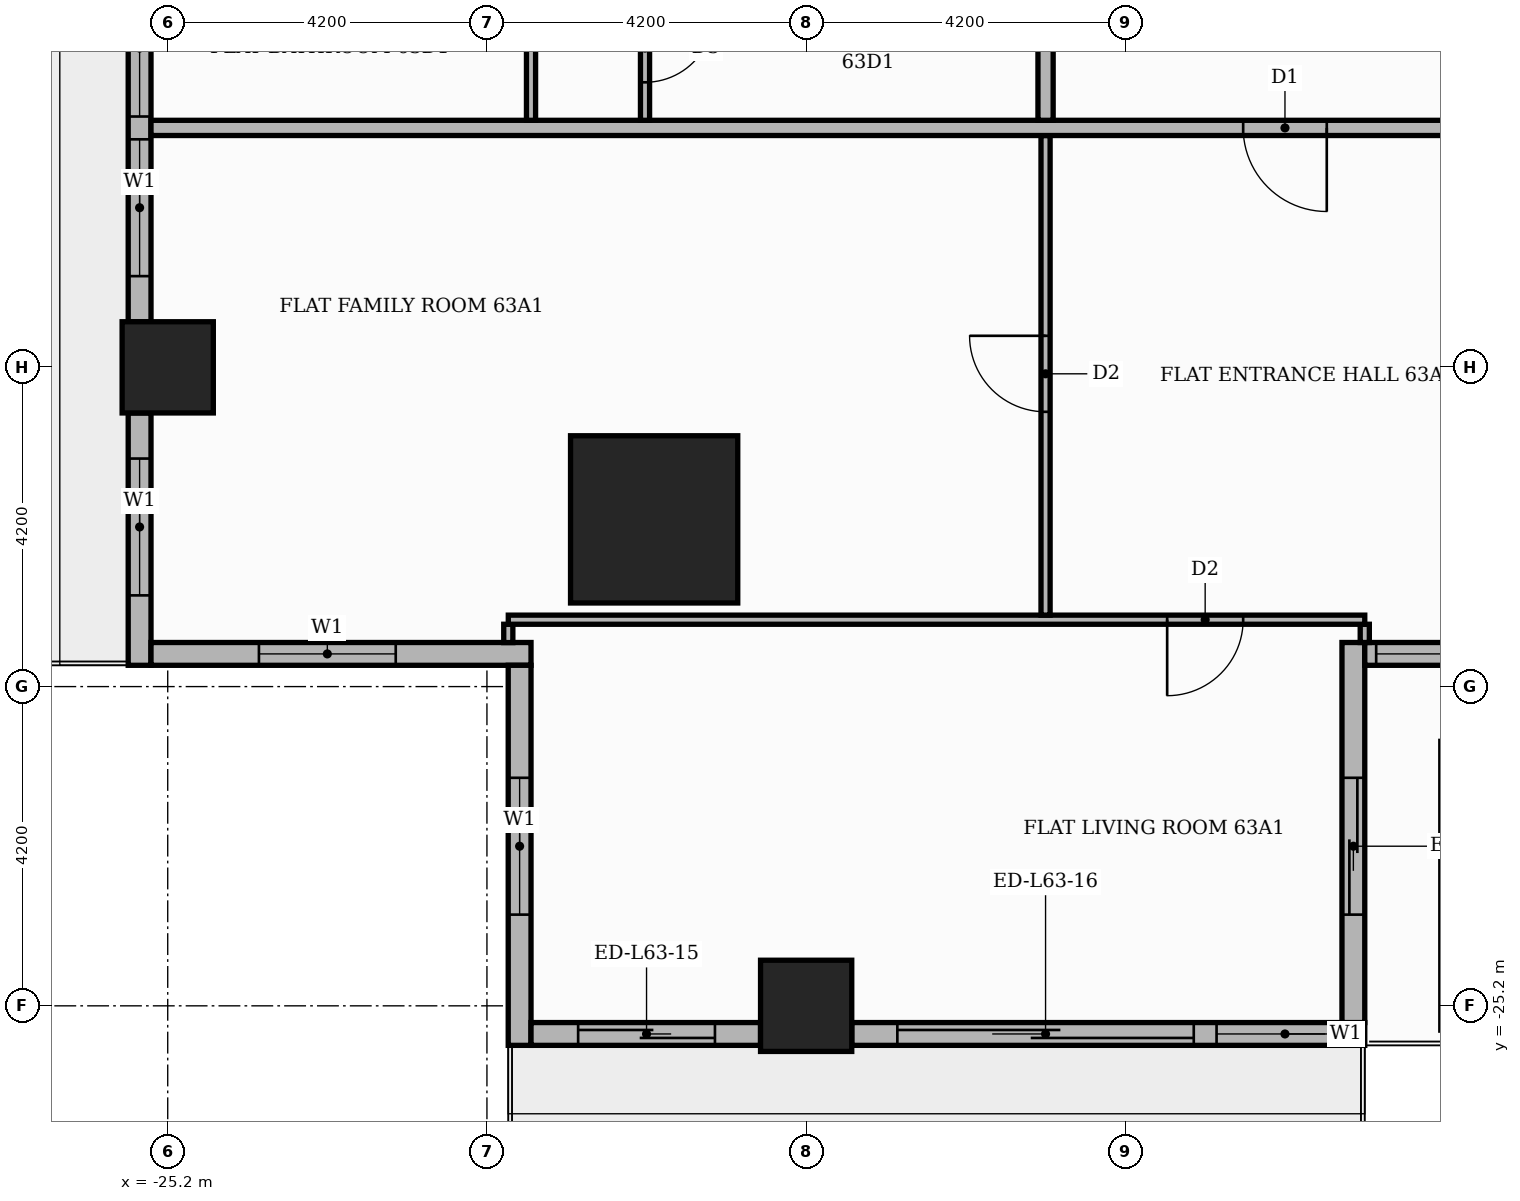
"""IFC4 building model, lengths in metres.
Left out: names, types, materials, properties, quantities, classifications, styles, units other than length and angle.
Written with IfcOpenShell. Run it as: python <this file> out.ifc"""

import sys

from ifc_helpers import new_model, si_unit, direction, frame, frame_2d, origin, origin_2d, place, context, subcontext, project, spatial, rectangle, extrude, element, fill, save


model = new_model("IFC4")
c1 = context("Model", 3, precision=1e-05, world=origin(), true_north=direction((0.0, 1.0)))
c2 = subcontext(c1, "Body", "Model", "MODEL_VIEW")
j1 = project(units=[si_unit("LENGTHUNIT", "METRE"), si_unit("PLANEANGLEUNIT", "RADIAN")], contexts=[c1])
p1 = place(None, origin())
s1 = spatial("IfcSite", under=j1, at=p1, CompositionType="ELEMENT")
p2 = place(p1, origin())
s2 = spatial("IfcBuilding", under=s1, at=p2, CompositionType="ELEMENT")
p3 = place(p2, frame((0.0, 0.0, 264.0)))
s3 = spatial("IfcBuildingStorey", under=s2, at=p3, CompositionType="ELEMENT", Elevation=264.0)
p4 = place(p3, frame((-18.8, -18.8, 0.0), z_axis=(0.0, 0.0, 1.0), x_axis=(1.0, 0.0, 0.0)))
e1 = element("IfcColumn", 1, at=p4, inside=s3, PredefinedType="COLUMN", context=c2, shape_type="SweptSolid", body=[
    extrude(rectangle(XDim=2.2, YDim=2.2, at=origin_2d()), origin(), (0.0, 0.0, 1.0), 3.9),
])
for number, where, z_axis, x_axis in (
    (2, (-16.8, -25.2, 0.0), (0.0, 0.0, 1.0), (1.0, 0.0, 0.0)),
    (3, (-25.2, -16.8, 0.0), (0.0, 0.0, 1.0), (1.0, 0.0, 0.0)),
):
    element("IfcColumn", number, at=place(p3, frame(where, z_axis=z_axis, x_axis=x_axis)), inside=s3, PredefinedType="COLUMN", context=c2, shape_type="SweptSolid", body=[
        extrude(rectangle(XDim=1.2, YDim=1.2, at=origin_2d()), origin(), (0.0, 0.0, 1.0), 3.9),
    ])
p5 = place(p3, frame((-25.57, -9.0, 0.0), z_axis=(0.0, 0.0, 1.0), x_axis=(0.0, -1.0, 0.0)))
e4 = element("IfcWall", 4, at=p5, inside=s3, PredefinedType="STANDARD", context=c2, shape_type="SweptSolid", body=[
    extrude(rectangle(XDim=7.2, YDim=0.3, at=frame_2d((3.6, 0.0))), origin(), (0.0, 0.0, 1.0), 3.48),
])
p6 = place(p5, frame((0.6, 0.0, 0.9)))
e5 = element("IfcOpeningElement", 5, at=p6, cuts=e4, PredefinedType="OPENING", context=c2, shape_type="SweptSolid", body=[
    extrude(rectangle(XDim=1.8, YDim=2.1, at=frame_2d((0.9, 1.05))), frame((0.0, 0.16, 0.0), z_axis=(0.0, -1.0, 0.0), x_axis=(1.0, 0.0, 0.0)), (0.0, 0.0, 1.0), 0.32),
])
p7 = place(p5, frame((2.7, 0.0, 0.9)))
e6 = element("IfcOpeningElement", 6, at=p7, cuts=e4, PredefinedType="OPENING", context=c2, shape_type="SweptSolid", body=[
    extrude(rectangle(XDim=1.8, YDim=2.1, at=frame_2d((0.9, 1.05))), frame((0.0, 0.16, 0.0), z_axis=(0.0, -1.0, 0.0), x_axis=(1.0, 0.0, 0.0)), (0.0, 0.0, 1.0), 0.32),
])
p8 = place(p5, frame((4.8, 0.0, 0.9)))
e7 = element("IfcOpeningElement", 7, at=p8, cuts=e4, PredefinedType="OPENING", context=c2, shape_type="SweptSolid", body=[
    extrude(rectangle(XDim=1.8, YDim=2.1, at=frame_2d((0.9, 1.05))), frame((0.0, 0.16, 0.0), z_axis=(0.0, -1.0, 0.0), x_axis=(1.0, 0.0, 0.0)), (0.0, 0.0, 1.0), 0.32),
])
p9 = place(p3, frame((-25.57, -17.4, 0.0), z_axis=(0.0, 0.0, 1.0), x_axis=(0.0, -1.0, 0.0)))
e8 = element("IfcWall", 8, at=p9, inside=s3, PredefinedType="STANDARD", context=c2, shape_type="SweptSolid", body=[
    extrude(rectangle(XDim=3.32, YDim=0.3, at=frame_2d((1.66, 0.0))), origin(), (0.0, 0.0, 1.0), 3.48),
])
p10 = place(p9, frame((0.6, 0.0, 0.9)))
e9 = element("IfcOpeningElement", 9, at=p10, cuts=e8, PredefinedType="OPENING", context=c2, shape_type="SweptSolid", body=[
    extrude(rectangle(XDim=1.8, YDim=2.1, at=frame_2d((0.9, 1.05))), frame((0.0, 0.16, 0.0), z_axis=(0.0, -1.0, 0.0), x_axis=(1.0, 0.0, 0.0)), (0.0, 0.0, 1.0), 0.32),
])
p11 = place(p3, frame((-25.42, -20.57, 0.0), z_axis=(0.0, 0.0, 1.0), x_axis=(1.0, 0.0, 0.0)))
e10 = element("IfcWall", 10, at=p11, inside=s3, PredefinedType="STANDARD", context=c2, shape_type="SweptSolid", body=[
    extrude(rectangle(XDim=5.0, YDim=0.3, at=frame_2d((2.5, 0.0))), origin(), (0.0, 0.0, 1.0), 3.48),
])
p12 = place(p11, frame((1.42, 0.0, 0.9)))
e11 = element("IfcOpeningElement", 11, at=p12, cuts=e10, PredefinedType="OPENING", context=c2, shape_type="SweptSolid", body=[
    extrude(rectangle(XDim=1.8, YDim=2.1, at=frame_2d((0.9, 1.05))), frame((0.0, 0.16, 0.0), z_axis=(0.0, -1.0, 0.0), x_axis=(1.0, 0.0, 0.0)), (0.0, 0.0, 1.0), 0.32),
])
p13 = place(p3, frame((-20.57, -20.72, 0.0), z_axis=(0.0, 0.0, 1.0), x_axis=(0.0, -1.0, 0.0)))
e12 = element("IfcWall", 12, at=p13, inside=s3, PredefinedType="STANDARD", context=c2, shape_type="SweptSolid", body=[
    extrude(rectangle(XDim=5.0, YDim=0.3, at=frame_2d((2.5, 0.0))), origin(), (0.0, 0.0, 1.0), 3.48),
])
p14 = place(p13, frame((1.48, 0.0, 0.9)))
e13 = element("IfcOpeningElement", 13, at=p14, cuts=e12, PredefinedType="OPENING", context=c2, shape_type="SweptSolid", body=[
    extrude(rectangle(XDim=1.8, YDim=2.1, at=frame_2d((0.9, 1.05))), frame((0.0, 0.16, 0.0), z_axis=(0.0, -1.0, 0.0), x_axis=(1.0, 0.0, 0.0)), (0.0, 0.0, 1.0), 0.32),
])
p15 = place(p3, frame((-20.42, -25.57, 0.0), z_axis=(0.0, 0.0, 1.0), x_axis=(1.0, 0.0, 0.0)))
e14 = element("IfcWall", 14, at=p15, inside=s3, PredefinedType="STANDARD", context=c2, shape_type="SweptSolid", body=[
    extrude(rectangle(XDim=3.02, YDim=0.3, at=frame_2d((1.51, 0.0))), origin(), (0.0, 0.0, 1.0), 3.48),
])
p16 = place(p15, frame((0.62, 0.0, 0.0)))
e15 = element("IfcOpeningElement", 15, at=p16, cuts=e14, PredefinedType="OPENING", context=c2, shape_type="SweptSolid", body=[
    extrude(rectangle(XDim=1.8, YDim=2.4, at=frame_2d((0.9, 1.2))), frame((0.0, 0.16, 0.0), z_axis=(0.0, -1.0, 0.0), x_axis=(1.0, 0.0, 0.0)), (0.0, 0.0, 1.0), 0.32),
])
p17 = place(p3, frame((-16.2, -25.57, 0.0), z_axis=(0.0, 0.0, 1.0), x_axis=(1.0, 0.0, 0.0)))
e16 = element("IfcWall", 16, at=p17, inside=s3, PredefinedType="STANDARD", context=c2, shape_type="SweptSolid", body=[
    extrude(rectangle(XDim=6.75, YDim=0.3, at=frame_2d((3.375, 0.0))), origin(), (0.0, 0.0, 1.0), 3.48),
])
p18 = place(p17, frame((0.6, 0.0, 0.0)))
e17 = element("IfcOpeningElement", 17, at=p18, cuts=e16, PredefinedType="OPENING", context=c2, shape_type="SweptSolid", body=[
    extrude(rectangle(XDim=3.9, YDim=2.4, at=frame_2d((1.95, 1.2))), frame((0.0, 0.16, 0.0), z_axis=(0.0, -1.0, 0.0), x_axis=(1.0, 0.0, 0.0)), (0.0, 0.0, 1.0), 0.32),
])
p19 = place(p17, frame((4.8, 0.0, 0.9)))
e18 = element("IfcOpeningElement", 18, at=p19, cuts=e16, PredefinedType="OPENING", context=c2, shape_type="SweptSolid", body=[
    extrude(rectangle(XDim=1.8, YDim=2.1, at=frame_2d((0.9, 1.05))), frame((0.0, 0.16, 0.0), z_axis=(0.0, -1.0, 0.0), x_axis=(1.0, 0.0, 0.0)), (0.0, 0.0, 1.0), 0.32),
])
p20 = place(p3, frame((-9.6, -25.42, 0.0), z_axis=(0.0, 0.0, 1.0), x_axis=(0.0, 1.0, 0.0)))
e19 = element("IfcWall", 19, at=p20, inside=s3, PredefinedType="STANDARD", context=c2, shape_type="SweptSolid", body=[
    extrude(rectangle(XDim=5.0, YDim=0.3, at=frame_2d((2.5, 0.0))), origin(), (0.0, 0.0, 1.0), 3.48),
])
p21 = place(p20, frame((1.42, 0.0, 0.0)))
e20 = element("IfcOpeningElement", 20, at=p21, cuts=e19, PredefinedType="OPENING", context=c2, shape_type="SweptSolid", body=[
    extrude(rectangle(XDim=1.8, YDim=2.4, at=frame_2d((0.9, 1.2))), frame((0.0, 0.16, 0.0), z_axis=(0.0, -1.0, 0.0), x_axis=(1.0, 0.0, 0.0)), (0.0, 0.0, 1.0), 0.32),
])
p22 = place(p3, frame((-9.45, -20.57, 0.0), z_axis=(0.0, 0.0, 1.0), x_axis=(1.0, 0.0, 0.0)))
e21 = element("IfcWall", 21, at=p22, inside=s3, PredefinedType="STANDARD", context=c2, shape_type="SweptSolid", body=[
    extrude(rectangle(XDim=19.2, YDim=0.3, at=frame_2d((9.6, 0.0))), origin(), (0.0, 0.0, 1.0), 3.48),
])
p23 = place(p22, frame((0.15, 0.0, 0.9)))
e22 = element("IfcOpeningElement", 22, at=p23, cuts=e21, PredefinedType="OPENING", context=c2, shape_type="SweptSolid", body=[
    extrude(rectangle(XDim=6.0, YDim=2.1, at=frame_2d((3.0, 1.05))), frame((0.0, 0.16, 0.0), z_axis=(0.0, -1.0, 0.0), x_axis=(1.0, 0.0, 0.0)), (0.0, 0.0, 1.0), 0.32),
])
p24 = place(p22, frame((6.45, 0.0, 0.9)))
e23 = element("IfcOpeningElement", 23, at=p24, cuts=e21, PredefinedType="OPENING", context=c2, shape_type="SweptSolid", body=[
    extrude(rectangle(XDim=6.0, YDim=2.1, at=frame_2d((3.0, 1.05))), frame((0.0, 0.16, 0.0), z_axis=(0.0, -1.0, 0.0), x_axis=(1.0, 0.0, 0.0)), (0.0, 0.0, 1.0), 0.32),
])
p25 = place(p22, frame((12.75, 0.0, 0.9)))
e24 = element("IfcOpeningElement", 24, at=p25, cuts=e21, PredefinedType="OPENING", context=c2, shape_type="SweptSolid", body=[
    extrude(rectangle(XDim=6.0, YDim=2.1, at=frame_2d((3.0, 1.05))), frame((0.0, 0.16, 0.0), z_axis=(0.0, -1.0, 0.0), x_axis=(1.0, 0.0, 0.0)), (0.0, 0.0, 1.0), 0.32),
])
p26 = place(p3, frame((-20.719, -20.421, 0.0), z_axis=(0.0, 0.0, 1.0), x_axis=(0.0, 1.0, 0.0)))
e25 = element("IfcWall", 25, at=p26, inside=s3, PredefinedType="PARTITIONING", context=c2, shape_type="SweptSolid", body=[
    extrude(rectangle(XDim=0.241, YDim=0.12, at=frame_2d((0.121, 0.0))), origin(), (0.0, 0.0, 1.0), 3.48),
])
p27 = place(p3, frame((-9.45, -20.42, 0.0), z_axis=(0.0, 0.0, 1.0), x_axis=(0.0, 1.0, 0.0)))
e26 = element("IfcWall", 26, at=p27, inside=s3, PredefinedType="PARTITIONING", context=c2, shape_type="SweptSolid", body=[
    extrude(rectangle(XDim=0.24, YDim=0.12, at=frame_2d((0.12, 0.0))), origin(), (0.0, 0.0, 1.0), 3.48),
])
p28 = place(p3, frame((-20.719, -20.12, 0.0), z_axis=(0.0, 0.0, 1.0), x_axis=(1.0, 0.0, 0.0)))
e27 = element("IfcWall", 27, at=p28, inside=s3, PredefinedType="PARTITIONING", context=c2, shape_type="SweptSolid", body=[
    extrude(rectangle(XDim=11.269, YDim=0.12, at=frame_2d((5.635, 0.0))), origin(), (0.0, 0.0, 1.0), 3.48),
])
p29 = place(p28, frame((8.669, 0.0, 0.0)))
e28 = element("IfcOpeningElement", 28, at=p29, cuts=e27, PredefinedType="OPENING", context=c2, shape_type="SweptSolid", body=[
    extrude(rectangle(XDim=1.0, YDim=2.1, at=frame_2d((0.5, 1.05))), frame((0.0, 0.07, 0.0), z_axis=(0.0, -1.0, 0.0), x_axis=(1.0, 0.0, 0.0)), (0.0, 0.0, 1.0), 0.14),
])
p30 = place(p3, frame((-13.65, -20.06, 0.0), z_axis=(0.0, 0.0, 1.0), x_axis=(0.0, 1.0, 0.0)))
e29 = element("IfcWall", 29, at=p30, inside=s3, PredefinedType="PARTITIONING", context=c2, shape_type="SweptSolid", body=[
    extrude(rectangle(XDim=6.31, YDim=0.12, at=frame_2d((3.155, 0.0))), origin(), (0.0, 0.0, 1.0), 3.48),
])
p31 = place(p30, frame((2.675, 0.0, 0.0)))
e30 = element("IfcOpeningElement", 30, at=p31, cuts=e29, PredefinedType="OPENING", context=c2, shape_type="SweptSolid", body=[
    extrude(rectangle(XDim=1.0, YDim=2.1, at=frame_2d((0.5, 1.05))), frame((0.0, 0.07, 0.0), z_axis=(0.0, -1.0, 0.0), x_axis=(1.0, 0.0, 0.0)), (0.0, 0.0, 1.0), 0.14),
])
p32 = place(p3, frame((-25.42, -13.65, 0.0), z_axis=(0.0, 0.0, 1.0), x_axis=(1.0, 0.0, 0.0)))
e31 = element("IfcWall", 31, at=p32, inside=s3, PredefinedType="PARTITIONING", context=c2, shape_type="SweptSolid", body=[
    extrude(rectangle(XDim=39.07, YDim=0.2, at=frame_2d((19.535, 0.0))), origin(), (0.0, 0.0, 1.0), 3.48),
])
p33 = place(p32, frame((14.37, 0.0, 0.0)))
e32 = element("IfcOpeningElement", 32, at=p33, cuts=e31, PredefinedType="OPENING", context=c2, shape_type="SweptSolid", body=[
    extrude(rectangle(XDim=1.1, YDim=2.4, at=frame_2d((0.55, 1.2))), frame((0.0, 0.11, 0.0), z_axis=(0.0, -1.0, 0.0), x_axis=(1.0, 0.0, 0.0)), (0.0, 0.0, 1.0), 0.22),
])
p34 = place(p3, frame((-20.42, -13.55, 0.0), z_axis=(0.0, 0.0, 1.0), x_axis=(0.0, 1.0, 0.0)))
e33 = element("IfcWall", 33, at=p34, inside=s3, PredefinedType="PARTITIONING", context=c2, shape_type="SweptSolid", body=[
    extrude(rectangle(XDim=1.94, YDim=0.12, at=frame_2d((0.97, 0.0))), origin(), (0.0, 0.0, 1.0), 3.48),
])
p35 = place(p3, frame((-18.92, -13.55, 0.0), z_axis=(0.0, 0.0, 1.0), x_axis=(0.0, 1.0, 0.0)))
e34 = element("IfcWall", 34, at=p35, inside=s3, PredefinedType="PARTITIONING", context=c2, shape_type="SweptSolid", body=[
    extrude(rectangle(XDim=1.94, YDim=0.12, at=frame_2d((0.97, 0.0))), origin(), (0.0, 0.0, 1.0), 3.48),
])
p36 = place(p35, frame((0.5, 0.0, 0.0)))
e35 = element("IfcOpeningElement", 35, at=p36, cuts=e34, PredefinedType="OPENING", context=c2, shape_type="SweptSolid", body=[
    extrude(rectangle(XDim=0.9, YDim=2.1, at=frame_2d((0.45, 1.05))), frame((0.0, 0.07, 0.0), z_axis=(0.0, -1.0, 0.0), x_axis=(1.0, 0.0, 0.0)), (0.0, 0.0, 1.0), 0.14),
])
p37 = place(p3, frame((-13.65, -13.55, 0.0), z_axis=(0.0, 0.0, 1.0), x_axis=(0.0, 1.0, 0.0)))
e36 = element("IfcWall", 36, at=p37, inside=s3, PredefinedType="PARTITIONING", context=c2, shape_type="SweptSolid", body=[
    extrude(rectangle(XDim=2.45, YDim=0.2, at=frame_2d((1.225, 0.0))), origin(), (0.0, 0.0, 1.0), 3.48),
])
p38 = place(p7, origin())
e37 = element("IfcWindow", 37, at=p38, inside=s3, PartitioningType="SINGLE_PANEL", PredefinedType="WINDOW", context=c2, shape_type="SweptSolid", body=[
    extrude(rectangle(XDim=1.8, YDim=2.1, at=frame_2d((0.9, 1.05))), frame((0.0, 0.03, 0.0), z_axis=(0.0, -1.0, 0.0), x_axis=(1.0, 0.0, 0.0)), (0.0, 0.0, 1.0), 0.06),
])
fill(e6, e37)
p39 = place(p8, origin())
e38 = element("IfcWindow", 38, at=p39, inside=s3, PartitioningType="SINGLE_PANEL", PredefinedType="WINDOW", context=c2, shape_type="SweptSolid", body=[
    extrude(rectangle(XDim=1.8, YDim=2.1, at=frame_2d((0.9, 1.05))), frame((0.0, 0.03, 0.0), z_axis=(0.0, -1.0, 0.0), x_axis=(1.0, 0.0, 0.0)), (0.0, 0.0, 1.0), 0.06),
])
fill(e7, e38)
p40 = place(p10, origin())
e39 = element("IfcWindow", 39, at=p40, inside=s3, PartitioningType="SINGLE_PANEL", PredefinedType="WINDOW", context=c2, shape_type="SweptSolid", body=[
    extrude(rectangle(XDim=1.8, YDim=2.1, at=frame_2d((0.9, 1.05))), frame((0.0, 0.03, 0.0), z_axis=(0.0, -1.0, 0.0), x_axis=(1.0, 0.0, 0.0)), (0.0, 0.0, 1.0), 0.06),
])
fill(e9, e39)
p41 = place(p12, origin())
e40 = element("IfcWindow", 40, at=p41, inside=s3, PartitioningType="SINGLE_PANEL", PredefinedType="WINDOW", context=c2, shape_type="SweptSolid", body=[
    extrude(rectangle(XDim=1.8, YDim=2.1, at=frame_2d((0.9, 1.05))), frame((0.0, 0.03, 0.0), z_axis=(0.0, -1.0, 0.0), x_axis=(1.0, 0.0, 0.0)), (0.0, 0.0, 1.0), 0.06),
])
fill(e11, e40)
p42 = place(p14, origin())
e41 = element("IfcWindow", 41, at=p42, inside=s3, PartitioningType="SINGLE_PANEL", PredefinedType="WINDOW", context=c2, shape_type="SweptSolid", body=[
    extrude(rectangle(XDim=1.8, YDim=2.1, at=frame_2d((0.9, 1.05))), frame((0.0, 0.03, 0.0), z_axis=(0.0, -1.0, 0.0), x_axis=(1.0, 0.0, 0.0)), (0.0, 0.0, 1.0), 0.06),
])
fill(e13, e41)
p43 = place(p16, origin())
e42 = element("IfcDoor", 42, at=p43, inside=s3, OperationType="SLIDING_TO_RIGHT", PredefinedType="DOOR", context=c2, shape_type="SweptSolid", body=[
    extrude(rectangle(XDim=1.8, YDim=2.4, at=frame_2d((0.9, 1.2))), frame((0.0, 0.025, 0.0), z_axis=(0.0, -1.0, 0.0), x_axis=(1.0, 0.0, 0.0)), (0.0, 0.0, 1.0), 0.05),
])
fill(e15, e42)
p44 = place(p18, origin())
e43 = element("IfcDoor", 43, at=p44, inside=s3, OperationType="SLIDING_TO_LEFT", PredefinedType="DOOR", context=c2, shape_type="SweptSolid", body=[
    extrude(rectangle(XDim=3.9, YDim=2.4, at=frame_2d((1.95, 1.2))), frame((0.0, 0.025, 0.0), z_axis=(0.0, -1.0, 0.0), x_axis=(1.0, 0.0, 0.0)), (0.0, 0.0, 1.0), 0.05),
])
fill(e17, e43)
p45 = place(p19, origin())
e44 = element("IfcWindow", 44, at=p45, inside=s3, PartitioningType="SINGLE_PANEL", PredefinedType="WINDOW", context=c2, shape_type="SweptSolid", body=[
    extrude(rectangle(XDim=1.8, YDim=2.1, at=frame_2d((0.9, 1.05))), frame((0.0, 0.03, 0.0), z_axis=(0.0, -1.0, 0.0), x_axis=(1.0, 0.0, 0.0)), (0.0, 0.0, 1.0), 0.06),
])
fill(e18, e44)
p46 = place(p21, origin())
e45 = element("IfcDoor", 45, at=p46, inside=s3, OperationType="SLIDING_TO_LEFT", PredefinedType="DOOR", context=c2, shape_type="SweptSolid", body=[
    extrude(rectangle(XDim=1.8, YDim=2.4, at=frame_2d((0.9, 1.2))), frame((0.0, 0.025, 0.0), z_axis=(0.0, -1.0, 0.0), x_axis=(1.0, 0.0, 0.0)), (0.0, 0.0, 1.0), 0.05),
])
fill(e20, e45)
p47 = place(p23, origin())
e46 = element("IfcWindow", 46, at=p47, inside=s3, PartitioningType="SINGLE_PANEL", PredefinedType="WINDOW", context=c2, shape_type="SweptSolid", body=[
    extrude(rectangle(XDim=6.0, YDim=2.1, at=frame_2d((3.0, 1.05))), frame((0.0, 0.03, 0.0), z_axis=(0.0, -1.0, 0.0), x_axis=(1.0, 0.0, 0.0)), (0.0, 0.0, 1.0), 0.06),
])
fill(e22, e46)
p48 = place(p33, frame((1.1, 0.0, 0.0), z_axis=(0.0, 0.0, 1.0), x_axis=(-1.0, 0.0, 0.0)))
e47 = element("IfcDoor", 47, at=p48, inside=s3, OperationType="SINGLE_SWING_RIGHT", PredefinedType="DOOR", context=c2, shape_type="SweptSolid", body=[
    extrude(rectangle(XDim=1.1, YDim=2.4, at=frame_2d((0.55, 1.2))), frame((0.0, 0.025, 0.0), z_axis=(0.0, -1.0, 0.0), x_axis=(1.0, 0.0, 0.0)), (0.0, 0.0, 1.0), 0.05),
])
fill(e32, e47)
p49 = place(p31, origin())
e48 = element("IfcDoor", 48, at=p49, inside=s3, OperationType="SINGLE_SWING_RIGHT", PredefinedType="DOOR", context=c2, shape_type="SweptSolid", body=[
    extrude(rectangle(XDim=1.0, YDim=2.1, at=frame_2d((0.5, 1.05))), frame((0.0, 0.025, 0.0), z_axis=(0.0, -1.0, 0.0), x_axis=(1.0, 0.0, 0.0)), (0.0, 0.0, 1.0), 0.05),
])
fill(e30, e48)
p50 = place(p29, frame((1.0, 0.0, 0.0), z_axis=(0.0, 0.0, 1.0), x_axis=(-1.0, 0.0, 0.0)))
e49 = element("IfcDoor", 49, at=p50, inside=s3, OperationType="SINGLE_SWING_LEFT", PredefinedType="DOOR", context=c2, shape_type="SweptSolid", body=[
    extrude(rectangle(XDim=1.0, YDim=2.1, at=frame_2d((0.5, 1.05))), frame((0.0, 0.025, 0.0), z_axis=(0.0, -1.0, 0.0), x_axis=(1.0, 0.0, 0.0)), (0.0, 0.0, 1.0), 0.05),
])
fill(e28, e49)
p51 = place(p36, frame((0.9, 0.0, 0.0), z_axis=(0.0, 0.0, 1.0), x_axis=(-1.0, 0.0, 0.0)))
e50 = element("IfcDoor", 50, at=p51, inside=s3, OperationType="SINGLE_SWING_RIGHT", PredefinedType="DOOR", context=c2, shape_type="SweptSolid", body=[
    extrude(rectangle(XDim=0.9, YDim=2.1, at=frame_2d((0.45, 1.05))), frame((0.0, 0.025, 0.0), z_axis=(0.0, -1.0, 0.0), x_axis=(1.0, 0.0, 0.0)), (0.0, 0.0, 1.0), 0.05),
])
fill(e35, e50)
save(model, sys.argv[1])
